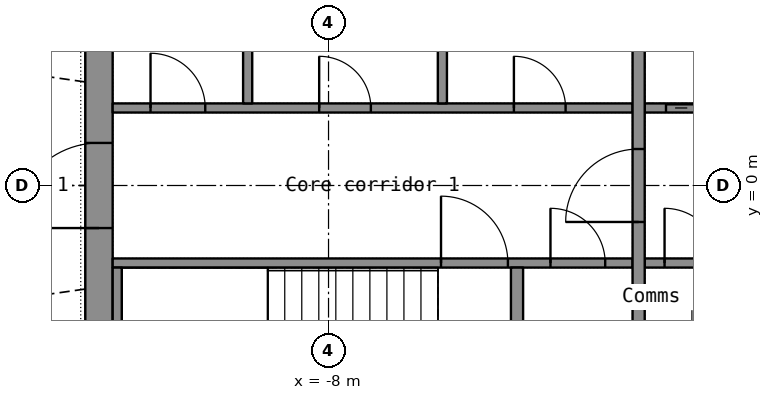
"""IFC4 building model, lengths in metres.
Left out: names, types, materials, properties, quantities, classifications, styles, units other than length and angle.
Written with IfcOpenShell. Run it as: python <this file> out.ifc"""

import sys

from ifc_helpers import new_model, si_unit, direction, frame, frame_2d, origin, place, context, subcontext, project, spatial, rectangle, extrude, element, fill, save


model = new_model("IFC4")
c1 = context("Model", 3, precision=1e-05, world=origin(), true_north=direction((0.0, 1.0)))
c2 = subcontext(c1, "Body", "Model", "MODEL_VIEW")
j1 = project(units=[si_unit("LENGTHUNIT", "METRE"), si_unit("PLANEANGLEUNIT", "RADIAN")], contexts=[c1])
p1 = place(None, origin())
s1 = spatial("IfcSite", under=j1, at=p1, CompositionType="ELEMENT")
p2 = place(p1, origin())
s2 = spatial("IfcBuilding", under=s1, at=p2, CompositionType="ELEMENT")
p3 = place(p2, frame((0.0, 0.0, 186.7)))
s3 = spatial("IfcBuildingStorey", under=s2, at=p3, CompositionType="ELEMENT", Elevation=186.7)
p4 = place(p3, frame((-11.775, -7.2, 0.0), z_axis=(0.0, 0.0, 1.0), x_axis=(0.0, 1.0, 0.0)))
e1 = element("IfcWall", 1, at=p4, inside=s3, PredefinedType="SHEAR", context=c2, shape_type="SweptSolid", body=[
    extrude(rectangle(XDim=14.4, YDim=0.45, at=frame_2d((7.2, 0.0))), origin(), (0.0, 0.0, 1.0), 3.3),
])
p5 = place(p4, frame((6.5, 0.0, 0.0)))
e2 = element("IfcOpeningElement", 2, at=p5, cuts=e1, PredefinedType="OPENING", context=c2, shape_type="SweptSolid", body=[
    extrude(rectangle(XDim=1.4, YDim=2.2, at=frame_2d((0.7, 1.1))), frame((0.0, 0.235, 0.0), z_axis=(0.0, -1.0, 0.0), x_axis=(1.0, 0.0, 0.0)), (0.0, 0.0, 1.0), 0.47),
])
p6 = place(p3, frame((-11.55, -1.275, 0.0), z_axis=(0.0, 0.0, 1.0), x_axis=(1.0, 0.0, 0.0)))
e3 = element("IfcWall", 3, at=p6, inside=s3, PredefinedType="SHEAR", context=c2, shape_type="SweptSolid", body=[
    extrude(rectangle(XDim=8.55, YDim=0.15, at=frame_2d((4.275, 0.0))), origin(), (0.0, 0.0, 1.0), 3.3),
])
p7 = place(p6, frame((5.4, 0.0, 0.0)))
e4 = element("IfcOpeningElement", 4, at=p7, cuts=e3, PredefinedType="OPENING", context=c2, shape_type="SweptSolid", body=[
    extrude(rectangle(XDim=1.1, YDim=2.15, at=frame_2d((0.55, 1.075))), frame((0.0, 0.085, 0.0), z_axis=(0.0, -1.0, 0.0), x_axis=(1.0, 0.0, 0.0)), (0.0, 0.0, 1.0), 0.17),
])
p8 = place(p6, frame((7.2, 0.0, 0.0)))
e5 = element("IfcOpeningElement", 5, at=p8, cuts=e3, PredefinedType="OPENING", context=c2, shape_type="SweptSolid", body=[
    extrude(rectangle(XDim=0.9, YDim=2.1, at=frame_2d((0.45, 1.05))), frame((0.0, 0.085, 0.0), z_axis=(0.0, -1.0, 0.0), x_axis=(1.0, 0.0, 0.0)), (0.0, 0.0, 1.0), 0.17),
])
p9 = place(p3, frame((-2.8, -1.275, 0.0), z_axis=(0.0, 0.0, 1.0), x_axis=(1.0, 0.0, 0.0)))
e6 = element("IfcWall", 6, at=p9, inside=s3, PredefinedType="SHEAR", context=c2, shape_type="SweptSolid", body=[
    extrude(rectangle(XDim=5.6, YDim=0.15, at=frame_2d((2.8, 0.0))), origin(), (0.0, 0.0, 1.0), 3.3),
])
p10 = place(p9, frame((4.15, 0.0, 0.0)))
e7 = element("IfcOpeningElement", 7, at=p10, cuts=e6, PredefinedType="OPENING", context=c2, shape_type="SweptSolid", body=[
    extrude(rectangle(XDim=1.1, YDim=2.2, at=frame_2d((0.55, 1.1))), frame((0.0, 0.085, 0.0), z_axis=(0.0, -1.0, 0.0), x_axis=(1.0, 0.0, 0.0)), (0.0, 0.0, 1.0), 0.17),
])
p11 = place(p9, frame((0.326, 0.0, 0.0)))
e8 = element("IfcOpeningElement", 8, at=p11, cuts=e6, PredefinedType="OPENING", context=c2, shape_type="SweptSolid", body=[
    extrude(rectangle(XDim=0.9, YDim=2.1, at=frame_2d((0.45, 1.05))), frame((0.0, 0.085, 0.0), z_axis=(0.0, -1.0, 0.0), x_axis=(1.0, 0.0, 0.0)), (0.0, 0.0, 1.0), 0.17),
])
p12 = place(p9, frame((2.201, 0.0, 0.0)))
e9 = element("IfcOpeningElement", 9, at=p12, cuts=e6, PredefinedType="OPENING", context=c2, shape_type="SweptSolid", body=[
    extrude(rectangle(XDim=0.9, YDim=2.1, at=frame_2d((0.45, 1.05))), frame((0.0, 0.085, 0.0), z_axis=(0.0, -1.0, 0.0), x_axis=(1.0, 0.0, 0.0)), (0.0, 0.0, 1.0), 0.17),
])
p13 = place(p3, frame((-11.55, 1.275, 0.0), z_axis=(0.0, 0.0, 1.0), x_axis=(1.0, 0.0, 0.0)))
e10 = element("IfcWall", 10, at=p13, inside=s3, PredefinedType="PARTITIONING", context=c2, shape_type="SweptSolid", body=[
    extrude(rectangle(XDim=8.55, YDim=0.15, at=frame_2d((4.275, 0.0))), origin(), (0.0, 0.0, 1.0), 3.3),
])
p14 = place(p13, frame((0.623, 0.0, 0.0)))
e11 = element("IfcOpeningElement", 11, at=p14, cuts=e10, PredefinedType="OPENING", context=c2, shape_type="SweptSolid", body=[
    extrude(rectangle(XDim=0.9, YDim=2.1, at=frame_2d((0.45, 1.05))), frame((0.0, 0.085, 0.0), z_axis=(0.0, -1.0, 0.0), x_axis=(1.0, 0.0, 0.0)), (0.0, 0.0, 1.0), 0.17),
])
p15 = place(p13, frame((3.396, 0.0, 0.0)))
e12 = element("IfcOpeningElement", 12, at=p15, cuts=e10, PredefinedType="OPENING", context=c2, shape_type="SweptSolid", body=[
    extrude(rectangle(XDim=0.85, YDim=2.1, at=frame_2d((0.425, 1.05))), frame((0.0, 0.085, 0.0), z_axis=(0.0, -1.0, 0.0), x_axis=(1.0, 0.0, 0.0)), (0.0, 0.0, 1.0), 0.17),
])
p16 = place(p13, frame((6.599, 0.0, 0.0)))
e13 = element("IfcOpeningElement", 13, at=p16, cuts=e10, PredefinedType="OPENING", context=c2, shape_type="SweptSolid", body=[
    extrude(rectangle(XDim=0.85, YDim=2.1, at=frame_2d((0.425, 1.05))), frame((0.0, 0.085, 0.0), z_axis=(0.0, -1.0, 0.0), x_axis=(1.0, 0.0, 0.0)), (0.0, 0.0, 1.0), 0.17),
])
p17 = place(p3, frame((-2.8, 1.275, 0.0), z_axis=(0.0, 0.0, 1.0), x_axis=(1.0, 0.0, 0.0)))
e14 = element("IfcWall", 14, at=p17, inside=s3, PredefinedType="SHEAR", context=c2, shape_type="SweptSolid", body=[
    extrude(rectangle(XDim=5.6, YDim=0.15, at=frame_2d((2.8, 0.0))), origin(), (0.0, 0.0, 1.0), 3.3),
])
p18 = place(p17, frame((0.35, 0.0, 0.0)))
e15 = element("IfcOpeningElement", 15, at=p18, cuts=e14, PredefinedType="OPENING", context=c2, shape_type="SweptSolid", body=[
    extrude(rectangle(XDim=1.1, YDim=2.2, at=frame_2d((0.55, 1.1))), frame((0.0, 0.085, 0.0), z_axis=(0.0, -1.0, 0.0), x_axis=(1.0, 0.0, 0.0)), (0.0, 0.0, 1.0), 0.17),
])
p19 = place(p17, frame((2.499, 0.0, 0.0)))
e16 = element("IfcOpeningElement", 16, at=p19, cuts=e14, PredefinedType="OPENING", context=c2, shape_type="SweptSolid", body=[
    extrude(rectangle(XDim=0.9, YDim=2.1, at=frame_2d((0.45, 1.05))), frame((0.0, 0.085, 0.0), z_axis=(0.0, -1.0, 0.0), x_axis=(1.0, 0.0, 0.0)), (0.0, 0.0, 1.0), 0.17),
])
p20 = place(p17, frame((4.374, 0.0, 0.0)))
e17 = element("IfcOpeningElement", 17, at=p20, cuts=e14, PredefinedType="OPENING", context=c2, shape_type="SweptSolid", body=[
    extrude(rectangle(XDim=0.9, YDim=2.1, at=frame_2d((0.45, 1.05))), frame((0.0, 0.085, 0.0), z_axis=(0.0, -1.0, 0.0), x_axis=(1.0, 0.0, 0.0)), (0.0, 0.0, 1.0), 0.17),
])
p21 = place(p3, frame((-2.9, -3.7, 0.0), z_axis=(0.0, 0.0, 1.0), x_axis=(0.0, 1.0, 0.0)))
e18 = element("IfcWall", 18, at=p21, inside=s3, PredefinedType="SHEAR", context=c2, shape_type="SweptSolid", body=[
    extrude(rectangle(XDim=7.4, YDim=0.2, at=frame_2d((3.7, 0.0))), origin(), (0.0, 0.0, 1.0), 3.3),
])
p22 = place(p21, frame((3.1, 0.0, 0.0)))
e19 = element("IfcOpeningElement", 19, at=p22, cuts=e18, PredefinedType="OPENING", context=c2, shape_type="SweptSolid", body=[
    extrude(rectangle(XDim=1.2, YDim=2.2, at=frame_2d((0.6, 1.1))), frame((0.0, 0.11, 0.0), z_axis=(0.0, -1.0, 0.0), x_axis=(1.0, 0.0, 0.0)), (0.0, 0.0, 1.0), 0.22),
])
p23 = place(p3, frame((-11.475, -3.7, 0.0), z_axis=(0.0, 0.0, 1.0), x_axis=(0.0, 1.0, 0.0)))
e20 = element("IfcWall", 20, at=p23, inside=s3, PredefinedType="SHEAR", context=c2, shape_type="SweptSolid", body=[
    extrude(rectangle(XDim=2.35, YDim=0.15, at=frame_2d((1.175, 0.0))), origin(), (0.0, 0.0, 1.0), 3.3),
])
p24 = place(p3, frame((-4.9, -3.7, 0.0), z_axis=(0.0, 0.0, 1.0), x_axis=(0.0, 1.0, 0.0)))
e21 = element("IfcWall", 21, at=p24, inside=s3, PredefinedType="SHEAR", context=c2, shape_type="SweptSolid", body=[
    extrude(rectangle(XDim=2.35, YDim=0.2, at=frame_2d((1.175, 0.0))), origin(), (0.0, 0.0, 1.0), 3.3),
])
for number, where, z_axis, x_axis in (
    (22, (-9.33, 1.35, 0.0), (0.0, 0.0, 1.0), (0.0, 1.0, 0.0)),
    (23, (-6.127, 1.35, 0.0), (0.0, 0.0, 1.0), (0.0, 1.0, 0.0)),
):
    element("IfcWall", number, at=place(p3, frame(where, z_axis=z_axis, x_axis=x_axis)), inside=s3, PredefinedType="PARTITIONING", context=c2, shape_type="SweptSolid", body=[
        extrude(rectangle(XDim=2.35, YDim=0.15, at=frame_2d((1.175, 0.0))), origin(), (0.0, 0.0, 1.0), 3.3),
    ])
p25 = place(p5, origin())
e24 = element("IfcDoor", 24, at=p25, inside=s3, OperationType="DOUBLE_DOOR_SINGLE_SWING", PredefinedType="DOOR", context=c2, shape_type="SweptSolid", body=[
    extrude(rectangle(XDim=1.4, YDim=2.2, at=frame_2d((0.7, 1.1))), frame((0.0, 0.025, 0.0), z_axis=(0.0, -1.0, 0.0), x_axis=(1.0, 0.0, 0.0)), (0.0, 0.0, 1.0), 0.05),
])
fill(e2, e24)
p26 = place(p22, origin())
e25 = element("IfcDoor", 25, at=p26, inside=s3, OperationType="SINGLE_SWING_LEFT", PredefinedType="DOOR", context=c2, shape_type="SweptSolid", body=[
    extrude(rectangle(XDim=1.2, YDim=2.2, at=frame_2d((0.6, 1.1))), frame((0.0, 0.025, 0.0), z_axis=(0.0, -1.0, 0.0), x_axis=(1.0, 0.0, 0.0)), (0.0, 0.0, 1.0), 0.05),
])
fill(e19, e25)
p27 = place(p18, origin())
e26 = element("IfcDoor", 26, at=p27, inside=s3, OperationType="DOUBLE_DOOR_SLIDING", PredefinedType="DOOR", context=c2, shape_type="SweptSolid", body=[
    extrude(rectangle(XDim=1.1, YDim=2.2, at=frame_2d((0.55, 1.1))), frame((0.0, 0.025, 0.0), z_axis=(0.0, -1.0, 0.0), x_axis=(1.0, 0.0, 0.0)), (0.0, 0.0, 1.0), 0.05),
])
fill(e15, e26)
p28 = place(p7, origin())
e27 = element("IfcDoor", 27, at=p28, inside=s3, OperationType="SINGLE_SWING_LEFT", PredefinedType="DOOR", context=c2, shape_type="SweptSolid", body=[
    extrude(rectangle(XDim=1.1, YDim=2.15, at=frame_2d((0.55, 1.075))), frame((0.0, 0.025, 0.0), z_axis=(0.0, -1.0, 0.0), x_axis=(1.0, 0.0, 0.0)), (0.0, 0.0, 1.0), 0.05),
])
fill(e4, e27)
p29 = place(p14, origin())
e28 = element("IfcDoor", 28, at=p29, inside=s3, OperationType="SINGLE_SWING_LEFT", PredefinedType="DOOR", context=c2, shape_type="SweptSolid", body=[
    extrude(rectangle(XDim=0.9, YDim=2.1, at=frame_2d((0.45, 1.05))), frame((0.0, 0.025, 0.0), z_axis=(0.0, -1.0, 0.0), x_axis=(1.0, 0.0, 0.0)), (0.0, 0.0, 1.0), 0.05),
])
fill(e11, e28)
p30 = place(p15, origin())
e29 = element("IfcDoor", 29, at=p30, inside=s3, OperationType="SINGLE_SWING_LEFT", PredefinedType="DOOR", context=c2, shape_type="SweptSolid", body=[
    extrude(rectangle(XDim=0.85, YDim=2.1, at=frame_2d((0.425, 1.05))), frame((0.0, 0.025, 0.0), z_axis=(0.0, -1.0, 0.0), x_axis=(1.0, 0.0, 0.0)), (0.0, 0.0, 1.0), 0.05),
])
fill(e12, e29)
p31 = place(p16, origin())
e30 = element("IfcDoor", 30, at=p31, inside=s3, OperationType="SINGLE_SWING_LEFT", PredefinedType="DOOR", context=c2, shape_type="SweptSolid", body=[
    extrude(rectangle(XDim=0.85, YDim=2.1, at=frame_2d((0.425, 1.05))), frame((0.0, 0.025, 0.0), z_axis=(0.0, -1.0, 0.0), x_axis=(1.0, 0.0, 0.0)), (0.0, 0.0, 1.0), 0.05),
])
fill(e13, e30)
p32 = place(p11, origin())
e31 = element("IfcDoor", 31, at=p32, inside=s3, OperationType="SINGLE_SWING_LEFT", PredefinedType="DOOR", context=c2, shape_type="SweptSolid", body=[
    extrude(rectangle(XDim=0.9, YDim=2.1, at=frame_2d((0.45, 1.05))), frame((0.0, 0.025, 0.0), z_axis=(0.0, -1.0, 0.0), x_axis=(1.0, 0.0, 0.0)), (0.0, 0.0, 1.0), 0.05),
])
fill(e8, e31)
p33 = place(p8, origin())
e32 = element("IfcDoor", 32, at=p33, inside=s3, OperationType="SINGLE_SWING_LEFT", PredefinedType="DOOR", context=c2, shape_type="SweptSolid", body=[
    extrude(rectangle(XDim=0.9, YDim=2.1, at=frame_2d((0.45, 1.05))), frame((0.0, 0.025, 0.0), z_axis=(0.0, -1.0, 0.0), x_axis=(1.0, 0.0, 0.0)), (0.0, 0.0, 1.0), 0.05),
])
fill(e5, e32)
save(model, sys.argv[1])
